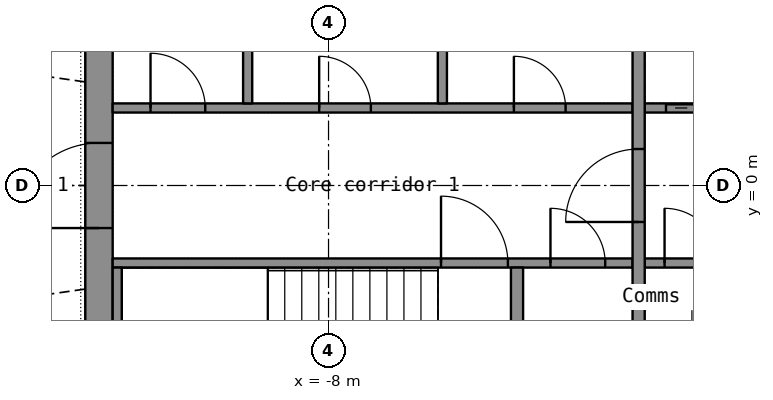
"""IFC4 building model, lengths in metres.
Left out: names, types, materials, properties, quantities, classifications, styles, units other than length and angle.
Written with IfcOpenShell. Run it as: python <this file> out.ifc"""

import sys

from ifc_helpers import new_model, si_unit, direction, frame, frame_2d, origin, place, context, subcontext, project, spatial, rectangle, extrude, element, fill, save


model = new_model("IFC4")
c1 = context("Model", 3, precision=1e-05, world=origin(), true_north=direction((0.0, 1.0)))
c2 = subcontext(c1, "Body", "Model", "MODEL_VIEW")
j1 = project(units=[si_unit("LENGTHUNIT", "METRE"), si_unit("PLANEANGLEUNIT", "RADIAN")], contexts=[c1])
p1 = place(None, origin())
s1 = spatial("IfcSite", under=j1, at=p1, CompositionType="ELEMENT")
p2 = place(p1, origin())
s2 = spatial("IfcBuilding", under=s1, at=p2, CompositionType="ELEMENT")
p3 = place(p2, frame((0.0, 0.0, 179.3)))
s3 = spatial("IfcBuildingStorey", under=s2, at=p3, CompositionType="ELEMENT", Elevation=179.3)
p4 = place(p3, frame((-11.775, -7.2, 0.0), z_axis=(0.0, 0.0, 1.0), x_axis=(0.0, 1.0, 0.0)))
e1 = element("IfcWall", 1, at=p4, inside=s3, PredefinedType="SHEAR", context=c2, shape_type="SweptSolid", body=[
    extrude(rectangle(XDim=14.4, YDim=0.45, at=frame_2d((7.2, 0.0))), origin(), (0.0, 0.0, 1.0), 3.3),
])
p5 = place(p4, frame((6.5, 0.0, 0.0)))
e2 = element("IfcOpeningElement", 2, at=p5, cuts=e1, PredefinedType="OPENING", context=c2, shape_type="SweptSolid", body=[
    extrude(rectangle(XDim=1.4, YDim=2.2, at=frame_2d((0.7, 1.1))), frame((0.0, 0.235, 0.0), z_axis=(0.0, -1.0, 0.0), x_axis=(1.0, 0.0, 0.0)), (0.0, 0.0, 1.0), 0.47),
])
p6 = place(p3, frame((-11.55, -1.275, 0.0), z_axis=(0.0, 0.0, 1.0), x_axis=(1.0, 0.0, 0.0)))
e3 = element("IfcWall", 3, at=p6, inside=s3, PredefinedType="SHEAR", context=c2, shape_type="SweptSolid", body=[
    extrude(rectangle(XDim=8.55, YDim=0.15, at=frame_2d((4.275, 0.0))), origin(), (0.0, 0.0, 1.0), 3.3),
])
p7 = place(p6, frame((5.4, 0.0, 0.0)))
e4 = element("IfcOpeningElement", 4, at=p7, cuts=e3, PredefinedType="OPENING", context=c2, shape_type="SweptSolid", body=[
    extrude(rectangle(XDim=1.1, YDim=2.15, at=frame_2d((0.55, 1.075))), frame((0.0, 0.085, 0.0), z_axis=(0.0, -1.0, 0.0), x_axis=(1.0, 0.0, 0.0)), (0.0, 0.0, 1.0), 0.17),
])
p8 = place(p6, frame((7.2, 0.0, 0.0)))
e5 = element("IfcOpeningElement", 5, at=p8, cuts=e3, PredefinedType="OPENING", context=c2, shape_type="SweptSolid", body=[
    extrude(rectangle(XDim=0.9, YDim=2.1, at=frame_2d((0.45, 1.05))), frame((0.0, 0.085, 0.0), z_axis=(0.0, -1.0, 0.0), x_axis=(1.0, 0.0, 0.0)), (0.0, 0.0, 1.0), 0.17),
])
p9 = place(p3, frame((-2.8, -1.275, 0.0), z_axis=(0.0, 0.0, 1.0), x_axis=(1.0, 0.0, 0.0)))
e6 = element("IfcWall", 6, at=p9, inside=s3, PredefinedType="SHEAR", context=c2, shape_type="SweptSolid", body=[
    extrude(rectangle(XDim=5.6, YDim=0.15, at=frame_2d((2.8, 0.0))), origin(), (0.0, 0.0, 1.0), 3.3),
])
p10 = place(p9, frame((4.15, 0.0, 0.0)))
e7 = element("IfcOpeningElement", 7, at=p10, cuts=e6, PredefinedType="OPENING", context=c2, shape_type="SweptSolid", body=[
    extrude(rectangle(XDim=1.1, YDim=2.2, at=frame_2d((0.55, 1.1))), frame((0.0, 0.085, 0.0), z_axis=(0.0, -1.0, 0.0), x_axis=(1.0, 0.0, 0.0)), (0.0, 0.0, 1.0), 0.17),
])
p11 = place(p9, frame((0.326, 0.0, 0.0)))
e8 = element("IfcOpeningElement", 8, at=p11, cuts=e6, PredefinedType="OPENING", context=c2, shape_type="SweptSolid", body=[
    extrude(rectangle(XDim=0.9, YDim=2.1, at=frame_2d((0.45, 1.05))), frame((0.0, 0.085, 0.0), z_axis=(0.0, -1.0, 0.0), x_axis=(1.0, 0.0, 0.0)), (0.0, 0.0, 1.0), 0.17),
])
p12 = place(p9, frame((2.201, 0.0, 0.0)))
e9 = element("IfcOpeningElement", 9, at=p12, cuts=e6, PredefinedType="OPENING", context=c2, shape_type="SweptSolid", body=[
    extrude(rectangle(XDim=0.9, YDim=2.1, at=frame_2d((0.45, 1.05))), frame((0.0, 0.085, 0.0), z_axis=(0.0, -1.0, 0.0), x_axis=(1.0, 0.0, 0.0)), (0.0, 0.0, 1.0), 0.17),
])
p13 = place(p3, frame((-11.55, 1.275, 0.0), z_axis=(0.0, 0.0, 1.0), x_axis=(1.0, 0.0, 0.0)))
e10 = element("IfcWall", 10, at=p13, inside=s3, PredefinedType="PARTITIONING", context=c2, shape_type="SweptSolid", body=[
    extrude(rectangle(XDim=8.55, YDim=0.15, at=frame_2d((4.275, 0.0))), origin(), (0.0, 0.0, 1.0), 3.3),
])
p14 = place(p13, frame((0.623, 0.0, 0.0)))
e11 = element("IfcOpeningElement", 11, at=p14, cuts=e10, PredefinedType="OPENING", context=c2, shape_type="SweptSolid", body=[
    extrude(rectangle(XDim=0.9, YDim=2.1, at=frame_2d((0.45, 1.05))), frame((0.0, 0.085, 0.0), z_axis=(0.0, -1.0, 0.0), x_axis=(1.0, 0.0, 0.0)), (0.0, 0.0, 1.0), 0.17),
])
p15 = place(p13, frame((3.396, 0.0, 0.0)))
e12 = element("IfcOpeningElement", 12, at=p15, cuts=e10, PredefinedType="OPENING", context=c2, shape_type="SweptSolid", body=[
    extrude(rectangle(XDim=0.85, YDim=2.1, at=frame_2d((0.425, 1.05))), frame((0.0, 0.085, 0.0), z_axis=(0.0, -1.0, 0.0), x_axis=(1.0, 0.0, 0.0)), (0.0, 0.0, 1.0), 0.17),
])
p16 = place(p13, frame((6.599, 0.0, 0.0)))
e13 = element("IfcOpeningElement", 13, at=p16, cuts=e10, PredefinedType="OPENING", context=c2, shape_type="SweptSolid", body=[
    extrude(rectangle(XDim=0.85, YDim=2.1, at=frame_2d((0.425, 1.05))), frame((0.0, 0.085, 0.0), z_axis=(0.0, -1.0, 0.0), x_axis=(1.0, 0.0, 0.0)), (0.0, 0.0, 1.0), 0.17),
])
p17 = place(p3, frame((-2.8, 1.275, 0.0), z_axis=(0.0, 0.0, 1.0), x_axis=(1.0, 0.0, 0.0)))
e14 = element("IfcWall", 14, at=p17, inside=s3, PredefinedType="SHEAR", context=c2, shape_type="SweptSolid", body=[
    extrude(rectangle(XDim=5.6, YDim=0.15, at=frame_2d((2.8, 0.0))), origin(), (0.0, 0.0, 1.0), 3.3),
])
p18 = place(p17, frame((0.35, 0.0, 0.0)))
e15 = element("IfcOpeningElement", 15, at=p18, cuts=e14, PredefinedType="OPENING", context=c2, shape_type="SweptSolid", body=[
    extrude(rectangle(XDim=1.1, YDim=2.2, at=frame_2d((0.55, 1.1))), frame((0.0, 0.085, 0.0), z_axis=(0.0, -1.0, 0.0), x_axis=(1.0, 0.0, 0.0)), (0.0, 0.0, 1.0), 0.17),
])
p19 = place(p17, frame((2.499, 0.0, 0.0)))
e16 = element("IfcOpeningElement", 16, at=p19, cuts=e14, PredefinedType="OPENING", context=c2, shape_type="SweptSolid", body=[
    extrude(rectangle(XDim=0.9, YDim=2.1, at=frame_2d((0.45, 1.05))), frame((0.0, 0.085, 0.0), z_axis=(0.0, -1.0, 0.0), x_axis=(1.0, 0.0, 0.0)), (0.0, 0.0, 1.0), 0.17),
])
p20 = place(p17, frame((4.374, 0.0, 0.0)))
e17 = element("IfcOpeningElement", 17, at=p20, cuts=e14, PredefinedType="OPENING", context=c2, shape_type="SweptSolid", body=[
    extrude(rectangle(XDim=0.9, YDim=2.1, at=frame_2d((0.45, 1.05))), frame((0.0, 0.085, 0.0), z_axis=(0.0, -1.0, 0.0), x_axis=(1.0, 0.0, 0.0)), (0.0, 0.0, 1.0), 0.17),
])
p21 = place(p3, frame((-2.9, -3.7, 0.0), z_axis=(0.0, 0.0, 1.0), x_axis=(0.0, 1.0, 0.0)))
e18 = element("IfcWall", 18, at=p21, inside=s3, PredefinedType="SHEAR", context=c2, shape_type="SweptSolid", body=[
    extrude(rectangle(XDim=7.4, YDim=0.2, at=frame_2d((3.7, 0.0))), origin(), (0.0, 0.0, 1.0), 3.3),
])
p22 = place(p21, frame((3.1, 0.0, 0.0)))
e19 = element("IfcOpeningElement", 19, at=p22, cuts=e18, PredefinedType="OPENING", context=c2, shape_type="SweptSolid", body=[
    extrude(rectangle(XDim=1.2, YDim=2.2, at=frame_2d((0.6, 1.1))), frame((0.0, 0.11, 0.0), z_axis=(0.0, -1.0, 0.0), x_axis=(1.0, 0.0, 0.0)), (0.0, 0.0, 1.0), 0.22),
])
p23 = place(p3, frame((-11.475, -3.7, 0.0), z_axis=(0.0, 0.0, 1.0), x_axis=(0.0, 1.0, 0.0)))
e20 = element("IfcWall", 20, at=p23, inside=s3, PredefinedType="SHEAR", context=c2, shape_type="SweptSolid", body=[
    extrude(rectangle(XDim=2.35, YDim=0.15, at=frame_2d((1.175, 0.0))), origin(), (0.0, 0.0, 1.0), 3.3),
])
p24 = place(p3, frame((-4.9, -3.7, 0.0), z_axis=(0.0, 0.0, 1.0), x_axis=(0.0, 1.0, 0.0)))
e21 = element("IfcWall", 21, at=p24, inside=s3, PredefinedType="SHEAR", context=c2, shape_type="SweptSolid", body=[
    extrude(rectangle(XDim=2.35, YDim=0.2, at=frame_2d((1.175, 0.0))), origin(), (0.0, 0.0, 1.0), 3.3),
])
for number, where, z_axis, x_axis in (
    (22, (-9.33, 1.35, 0.0), (0.0, 0.0, 1.0), (0.0, 1.0, 0.0)),
    (23, (-6.127, 1.35, 0.0), (0.0, 0.0, 1.0), (0.0, 1.0, 0.0)),
):
    element("IfcWall", number, at=place(p3, frame(where, z_axis=z_axis, x_axis=x_axis)), inside=s3, PredefinedType="PARTITIONING", context=c2, shape_type="SweptSolid", body=[
        extrude(rectangle(XDim=2.35, YDim=0.15, at=frame_2d((1.175, 0.0))), origin(), (0.0, 0.0, 1.0), 3.3),
    ])
p25 = place(p5, origin())
e24 = element("IfcDoor", 24, at=p25, inside=s3, OperationType="DOUBLE_DOOR_SINGLE_SWING", PredefinedType="DOOR", context=c2, shape_type="SweptSolid", body=[
    extrude(rectangle(XDim=1.4, YDim=2.2, at=frame_2d((0.7, 1.1))), frame((0.0, 0.025, 0.0), z_axis=(0.0, -1.0, 0.0), x_axis=(1.0, 0.0, 0.0)), (0.0, 0.0, 1.0), 0.05),
])
fill(e2, e24)
p26 = place(p22, origin())
e25 = element("IfcDoor", 25, at=p26, inside=s3, OperationType="SINGLE_SWING_LEFT", PredefinedType="DOOR", context=c2, shape_type="SweptSolid", body=[
    extrude(rectangle(XDim=1.2, YDim=2.2, at=frame_2d((0.6, 1.1))), frame((0.0, 0.025, 0.0), z_axis=(0.0, -1.0, 0.0), x_axis=(1.0, 0.0, 0.0)), (0.0, 0.0, 1.0), 0.05),
])
fill(e19, e25)
p27 = place(p18, origin())
e26 = element("IfcDoor", 26, at=p27, inside=s3, OperationType="DOUBLE_DOOR_SLIDING", PredefinedType="DOOR", context=c2, shape_type="SweptSolid", body=[
    extrude(rectangle(XDim=1.1, YDim=2.2, at=frame_2d((0.55, 1.1))), frame((0.0, 0.025, 0.0), z_axis=(0.0, -1.0, 0.0), x_axis=(1.0, 0.0, 0.0)), (0.0, 0.0, 1.0), 0.05),
])
fill(e15, e26)
p28 = place(p7, origin())
e27 = element("IfcDoor", 27, at=p28, inside=s3, OperationType="SINGLE_SWING_LEFT", PredefinedType="DOOR", context=c2, shape_type="SweptSolid", body=[
    extrude(rectangle(XDim=1.1, YDim=2.15, at=frame_2d((0.55, 1.075))), frame((0.0, 0.025, 0.0), z_axis=(0.0, -1.0, 0.0), x_axis=(1.0, 0.0, 0.0)), (0.0, 0.0, 1.0), 0.05),
])
fill(e4, e27)
p29 = place(p14, origin())
e28 = element("IfcDoor", 28, at=p29, inside=s3, OperationType="SINGLE_SWING_LEFT", PredefinedType="DOOR", context=c2, shape_type="SweptSolid", body=[
    extrude(rectangle(XDim=0.9, YDim=2.1, at=frame_2d((0.45, 1.05))), frame((0.0, 0.025, 0.0), z_axis=(0.0, -1.0, 0.0), x_axis=(1.0, 0.0, 0.0)), (0.0, 0.0, 1.0), 0.05),
])
fill(e11, e28)
p30 = place(p15, origin())
e29 = element("IfcDoor", 29, at=p30, inside=s3, OperationType="SINGLE_SWING_LEFT", PredefinedType="DOOR", context=c2, shape_type="SweptSolid", body=[
    extrude(rectangle(XDim=0.85, YDim=2.1, at=frame_2d((0.425, 1.05))), frame((0.0, 0.025, 0.0), z_axis=(0.0, -1.0, 0.0), x_axis=(1.0, 0.0, 0.0)), (0.0, 0.0, 1.0), 0.05),
])
fill(e12, e29)
p31 = place(p16, origin())
e30 = element("IfcDoor", 30, at=p31, inside=s3, OperationType="SINGLE_SWING_LEFT", PredefinedType="DOOR", context=c2, shape_type="SweptSolid", body=[
    extrude(rectangle(XDim=0.85, YDim=2.1, at=frame_2d((0.425, 1.05))), frame((0.0, 0.025, 0.0), z_axis=(0.0, -1.0, 0.0), x_axis=(1.0, 0.0, 0.0)), (0.0, 0.0, 1.0), 0.05),
])
fill(e13, e30)
p32 = place(p11, origin())
e31 = element("IfcDoor", 31, at=p32, inside=s3, OperationType="SINGLE_SWING_LEFT", PredefinedType="DOOR", context=c2, shape_type="SweptSolid", body=[
    extrude(rectangle(XDim=0.9, YDim=2.1, at=frame_2d((0.45, 1.05))), frame((0.0, 0.025, 0.0), z_axis=(0.0, -1.0, 0.0), x_axis=(1.0, 0.0, 0.0)), (0.0, 0.0, 1.0), 0.05),
])
fill(e8, e31)
p33 = place(p8, origin())
e32 = element("IfcDoor", 32, at=p33, inside=s3, OperationType="SINGLE_SWING_LEFT", PredefinedType="DOOR", context=c2, shape_type="SweptSolid", body=[
    extrude(rectangle(XDim=0.9, YDim=2.1, at=frame_2d((0.45, 1.05))), frame((0.0, 0.025, 0.0), z_axis=(0.0, -1.0, 0.0), x_axis=(1.0, 0.0, 0.0)), (0.0, 0.0, 1.0), 0.05),
])
fill(e5, e32)
save(model, sys.argv[1])
